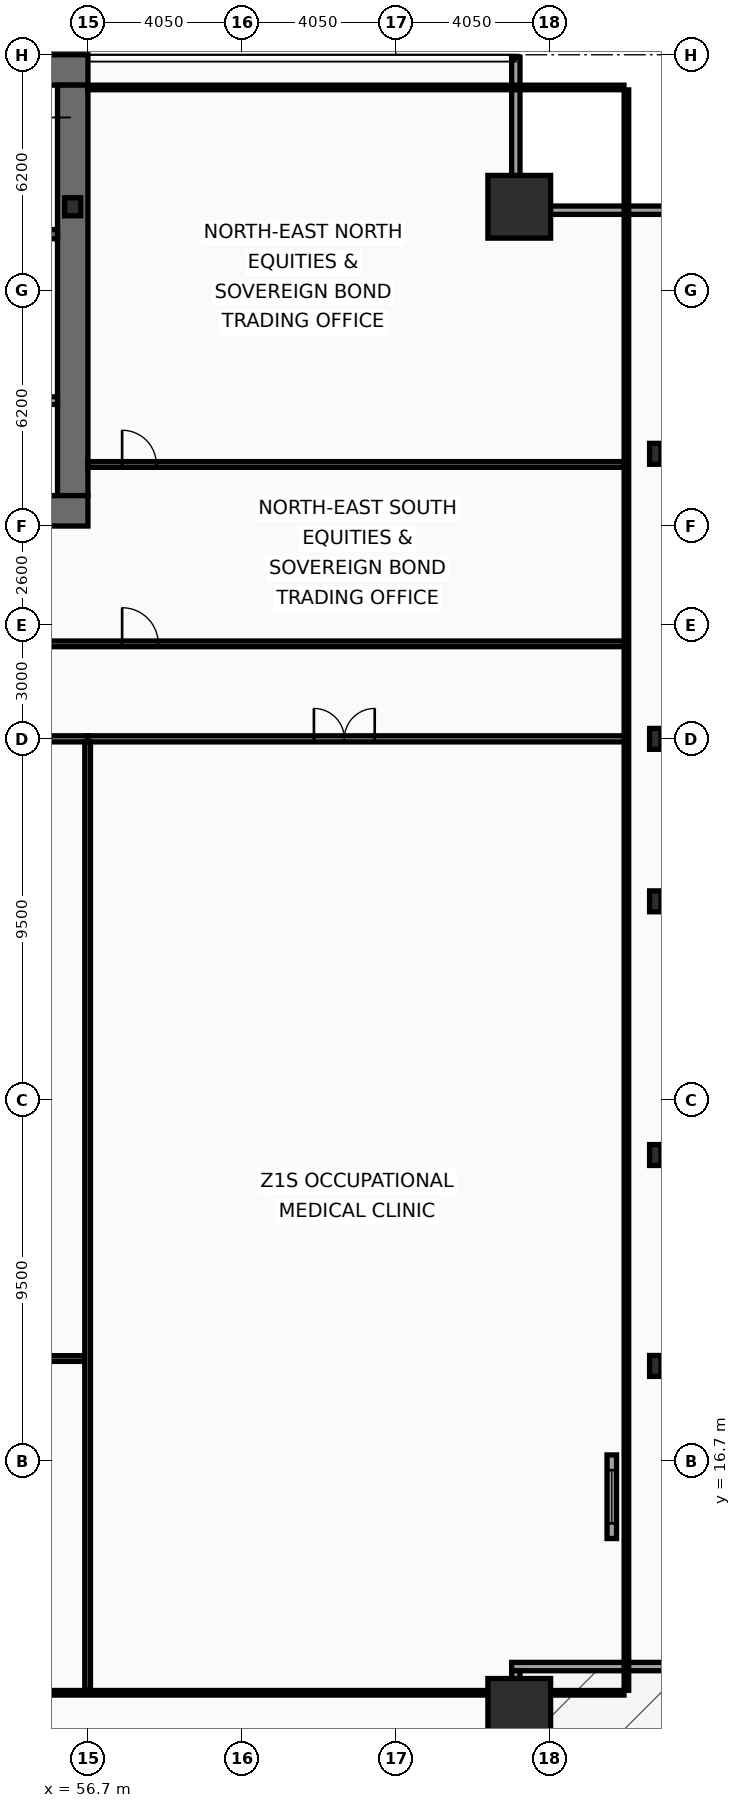
"""IFC4 building model, lengths in metres.
Left out: names, types, materials, properties, quantities, classifications, styles, units other than length and angle.
Written with IfcOpenShell. Run it as: python <this file> out.ifc"""

import sys

from ifc_helpers import new_model, si_unit, direction, frame, frame_2d, origin, origin_2d, place, context, subcontext, project, spatial, rectangle, hollow_rectangle, i_section, extrude, element, fill, save


model = new_model("IFC4")
c1 = context("Model", 3, precision=1e-05, world=origin(), true_north=direction((0.0, 1.0)))
c2 = subcontext(c1, "Body", "Model", "MODEL_VIEW")
j1 = project(units=[si_unit("LENGTHUNIT", "METRE"), si_unit("PLANEANGLEUNIT", "RADIAN")], contexts=[c1])
p1 = place(None, origin())
s1 = spatial("IfcSite", under=j1, at=p1, CompositionType="ELEMENT")
p2 = place(p1, origin())
s2 = spatial("IfcBuilding", under=s1, at=p2, CompositionType="ELEMENT")
p3 = place(p2, frame((0.0, 0.0, 25.8)))
s3 = spatial("IfcBuildingStorey", under=s2, at=p3, CompositionType="ELEMENT", Elevation=25.8)
p4 = place(p3, frame((16.2, 53.3, 0.0), z_axis=(0.0, 0.0, 1.0), x_axis=(1.0, 0.0, 0.0)))
e1 = element("IfcWall", 1, at=p4, inside=s3, PredefinedType="SHEAR", context=c2, shape_type="SweptSolid", body=[
    extrude(rectangle(XDim=40.5, YDim=0.8, at=frame_2d((20.25, 0.0))), origin(), (0.0, 0.0, 1.0), 3.82),
])
p5 = place(p3, frame((56.3, 52.9, 0.0), z_axis=(0.0, 0.0, 1.0), x_axis=(0.0, -1.0, 0.0)))
e2 = element("IfcWall", 2, at=p5, inside=s3, PredefinedType="SHEAR", context=c2, shape_type="SweptSolid", body=[
    extrude(rectangle(XDim=10.8, YDim=0.8, at=frame_2d((5.4, 0.0))), origin(), (0.0, 0.0, 1.0), 3.82),
])
p6 = place(p3, frame((56.7, 41.7, 0.0), z_axis=(0.0, 0.0, 1.0), x_axis=(-1.0, 0.0, 0.0)))
e3 = element("IfcWall", 3, at=p6, inside=s3, PredefinedType="SHEAR", context=c2, shape_type="SweptSolid", body=[
    extrude(rectangle(XDim=2.45, YDim=0.8, at=frame_2d((1.225, 0.0))), origin(), (0.0, 0.0, 1.0), 3.82),
])
p7 = place(p3, frame((48.63, 48.98, 0.0), z_axis=(0.0, 0.0, 1.0), x_axis=(1.0, 0.0, 0.0)))
e4 = element("IfcWall", 4, at=p7, inside=s3, PredefinedType="SHEAR", context=c2, shape_type="SweptSolid", body=[
    extrude(rectangle(XDim=7.27, YDim=0.24, at=frame_2d((3.635, 0.0))), origin(), (0.0, 0.0, 1.0), 3.82),
])
p8 = place(p7, frame((6.0, 0.0, 0.0)))
e5 = element("IfcOpeningElement", 5, at=p8, cuts=e4, PredefinedType="OPENING", context=c2, shape_type="SweptSolid", body=[
    extrude(rectangle(XDim=1.05, YDim=2.15, at=frame_2d((0.525, 1.075))), frame((0.0, 0.13, 0.0), z_axis=(0.0, -1.0, 0.0), x_axis=(1.0, 0.0, 0.0)), (0.0, 0.0, 1.0), 0.26),
])
for number, where, z_axis, x_axis in (
    (6, (68.05, 10.15, 0.0), (0.0, 0.0, 1.0), (1.0, 0.0, 0.0)),
    (7, (68.05, 49.7, 0.0), (0.0, 0.0, 1.0), (1.0, 0.0, 0.0)),
):
    element("IfcColumn", number, at=place(p3, frame(where, z_axis=z_axis, x_axis=x_axis)), inside=s3, PredefinedType="COLUMN", context=c2, shape_type="SweptSolid", body=[
        extrude(hollow_rectangle(XDim=1.65, YDim=1.65, WallThickness=0.075, at=origin_2d()), origin(), (0.0, 0.0, 1.0), 4.0),
    ])
for number, where, z_axis, x_axis in (
    (8, (71.63, 19.2, 0.0), (0.0, 0.0, 1.0), (1.0, 0.0, 0.0)),
    (9, (71.63, 24.75, 0.0), (0.0, 0.0, 1.0), (1.0, 0.0, 0.0)),
    (10, (71.63, 31.425, 0.0), (0.0, 0.0, 1.0), (1.0, 0.0, 0.0)),
    (11, (71.63, 35.7, 0.0), (0.0, 0.0, 1.0), (1.0, 0.0, 0.0)),
    (12, (71.63, 43.2, 0.0), (0.0, 0.0, 1.0), (1.0, 0.0, 0.0)),
):
    element("IfcColumn", number, at=place(p3, frame(where, z_axis=z_axis, x_axis=x_axis)), inside=s3, PredefinedType="COLUMN", context=c2, shape_type="SweptSolid", body=[
        extrude(i_section(OverallWidth=0.3, OverallDepth=0.55, WebThickness=0.015, FlangeThickness=0.029, at=origin_2d()), origin(), (0.0, 0.0, 1.0), 4.0),
    ])
p9 = place(p3, frame((56.3, 49.7, 0.0), z_axis=(0.0, 0.0, 1.0), x_axis=(1.0, 0.0, 0.0)))
e13 = element("IfcColumn", 13, at=p9, inside=s3, PredefinedType="COLUMN", context=c2, shape_type="SweptSolid", body=[
    extrude(i_section(OverallWidth=0.424, OverallDepth=0.474, WebThickness=0.048, FlangeThickness=0.077, at=origin_2d()), origin(), (0.0, 0.0, 1.0), 4.0),
])
p10 = place(p3, frame((67.96, 53.63, 0.0), z_axis=(0.0, 0.0, 1.0), x_axis=(0.0, -1.0, 0.0)))
e14 = element("IfcWall", 14, at=p10, inside=s3, PredefinedType="SOLIDWALL", context=c2, shape_type="SweptSolid", body=[
    extrude(rectangle(XDim=3.91, YDim=0.22, at=frame_2d((1.955, 0.0))), origin(), (0.0, 0.0, 1.0), 3.16),
])
for number, where, z_axis, x_axis in (
    (15, (67.85, 49.61, 0.0), (0.0, 0.0, 1.0), (1.0, 0.0, 0.0)),
    (16, (72.07, 11.29, 0.0), (0.0, 0.0, 1.0), (-1.0, 0.0, 0.0)),
):
    element("IfcWall", number, at=place(p3, frame(where, z_axis=z_axis, x_axis=x_axis)), inside=s3, PredefinedType="SOLIDWALL", context=c2, shape_type="SweptSolid", body=[
        extrude(rectangle(XDim=4.22, YDim=0.22, at=frame_2d((2.11, 0.0))), origin(), (0.0, 0.0, 1.0), 3.16),
    ])
p11 = place(p3, frame((67.96, 11.18, 0.0), z_axis=(0.0, 0.0, 1.0), x_axis=(0.0, -1.0, 0.0)))
e17 = element("IfcWall", 17, at=p11, inside=s3, PredefinedType="SOLIDWALL", context=c2, shape_type="SweptSolid", body=[
    extrude(rectangle(XDim=3.91, YDim=0.22, at=frame_2d((1.955, 0.0))), origin(), (0.0, 0.0, 1.0), 3.16),
])
p12 = place(p3, frame((70.485, 14.658, 0.0), z_axis=(0.0, 0.0, 1.0), x_axis=(0.0, 1.0, 0.0)))
e18 = element("IfcWall", 18, at=p12, inside=s3, PredefinedType="PARAPET", context=c2, shape_type="SweptSolid", body=[
    extrude(rectangle(XDim=2.2, YDim=0.25, at=frame_2d((1.1, 0.0))), origin(), (0.0, 0.0, 1.0), 0.88),
])
p13 = place(p12, frame((0.4, 0.0, 0.16)))
e19 = element("IfcOpeningElement", 19, at=p13, cuts=e18, PredefinedType="OPENING", context=c2, shape_type="SweptSolid", body=[
    extrude(rectangle(XDim=1.4, YDim=0.5, at=frame_2d((0.7, 0.25))), frame((0.0, 0.135, 0.0), z_axis=(0.0, -1.0, 0.0), x_axis=(1.0, 0.0, 0.0)), (0.0, 0.0, 1.0), 0.27),
])
p14 = place(p3, frame((51.9, 44.6, 0.0), z_axis=(0.0, 0.0, 1.0), x_axis=(1.0, 0.0, 0.0)))
e20 = element("IfcWall", 20, at=p14, inside=s3, PredefinedType="PARTITIONING", context=c2, shape_type="SweptSolid", body=[
    extrude(rectangle(XDim=4.0, YDim=0.2, at=frame_2d((2.0, 0.0))), origin(), (0.0, 0.0, 1.0), 3.82),
])
p15 = place(p14, frame((1.15, 0.0, 0.0)))
e21 = element("IfcOpeningElement", 21, at=p15, cuts=e20, PredefinedType="OPENING", context=c2, shape_type="SweptSolid", body=[
    extrude(rectangle(XDim=1.05, YDim=2.15, at=frame_2d((0.525, 1.075))), frame((0.0, 0.11, 0.0), z_axis=(0.0, -1.0, 0.0), x_axis=(1.0, 0.0, 0.0)), (0.0, 0.0, 1.0), 0.22),
])
p16 = place(p3, frame((54.35, 38.2, 0.0), z_axis=(0.0, 0.0, 1.0), x_axis=(1.0, 0.0, 0.0)))
e22 = element("IfcWall", 22, at=p16, inside=s3, PredefinedType="PARTITIONING", context=c2, shape_type="SweptSolid", body=[
    extrude(rectangle(XDim=16.52, YDim=0.15, at=frame_2d((8.26, 0.0))), origin(), (0.0, 0.0, 1.0), 3.01),
])
p17 = place(p16, frame((3.25, 0.0, 0.0)))
e23 = element("IfcOpeningElement", 23, at=p17, cuts=e22, PredefinedType="OPENING", context=c2, shape_type="SweptSolid", body=[
    extrude(rectangle(XDim=0.95, YDim=2.05, at=frame_2d((0.475, 1.025))), frame((0.0, 0.085, 0.0), z_axis=(0.0, -1.0, 0.0), x_axis=(1.0, 0.0, 0.0)), (0.0, 0.0, 1.0), 0.17),
])
p18 = place(p3, frame((56.7, 42.92, 0.0), z_axis=(0.0, 0.0, 1.0), x_axis=(1.0, 0.0, 0.0)))
e24 = element("IfcWall", 24, at=p18, inside=s3, PredefinedType="PARTITIONING", context=c2, shape_type="SweptSolid", body=[
    extrude(rectangle(XDim=14.105, YDim=0.15, at=frame_2d((7.052, 0.0))), origin(), (0.0, 0.0, 1.0), 3.01),
])
p19 = place(p18, frame((0.9, 0.0, 0.0)))
e25 = element("IfcOpeningElement", 25, at=p19, cuts=e24, PredefinedType="OPENING", context=c2, shape_type="SweptSolid", body=[
    extrude(rectangle(XDim=0.9, YDim=2.05, at=frame_2d((0.45, 1.025))), frame((0.0, 0.085, 0.0), z_axis=(0.0, -1.0, 0.0), x_axis=(1.0, 0.0, 0.0)), (0.0, 0.0, 1.0), 0.17),
])
p20 = place(p3, frame((42.487, 35.7, 0.0), z_axis=(0.0, 0.0, 1.0), x_axis=(1.0, 0.0, 0.0)))
e26 = element("IfcWall", 26, at=p20, inside=s3, PredefinedType="PARTITIONING", context=c2, shape_type="SweptSolid", body=[
    extrude(rectangle(XDim=14.205, YDim=0.16, at=frame_2d((7.103, 0.0))), origin(), (0.0, 0.0, 1.0), 3.01),
])
p21 = place(p20, frame((6.216, 0.0, 0.0)))
e27 = element("IfcOpeningElement", 27, at=p21, cuts=e26, PredefinedType="OPENING", context=c2, shape_type="SweptSolid", body=[
    extrude(rectangle(XDim=1.6, YDim=2.15, at=frame_2d((0.8, 1.075))), frame((0.0, 0.09, 0.0), z_axis=(0.0, -1.0, 0.0), x_axis=(1.0, 0.0, 0.0)), (0.0, 0.0, 1.0), 0.18),
])
p22 = place(p3, frame((42.567, 19.395, 0.0), z_axis=(0.0, 0.0, 1.0), x_axis=(1.0, 0.0, 0.0)))
e28 = element("IfcWall", 28, at=p22, inside=s3, PredefinedType="PARTITIONING", context=c2, shape_type="SweptSolid", body=[
    extrude(rectangle(XDim=14.046, YDim=0.15, at=frame_2d((7.023, 0.0))), origin(), (0.0, 0.0, 1.0), 3.01),
])
p23 = place(p22, frame((6.393, 0.0, 0.0)))
e29 = element("IfcOpeningElement", 29, at=p23, cuts=e28, PredefinedType="OPENING", context=c2, shape_type="SweptSolid", body=[
    extrude(rectangle(XDim=0.9, YDim=2.05, at=frame_2d((0.45, 1.025))), frame((0.0, 0.085, 0.0), z_axis=(0.0, -1.0, 0.0), x_axis=(1.0, 0.0, 0.0)), (0.0, 0.0, 1.0), 0.17),
])
p24 = place(p3, frame((56.692, 35.7, 0.0), z_axis=(0.0, 0.0, 1.0), x_axis=(1.0, 0.0, 0.0)))
e30 = element("IfcWall", 30, at=p24, inside=s3, PredefinedType="PARTITIONING", context=c2, shape_type="SweptSolid", body=[
    extrude(rectangle(XDim=14.178, YDim=0.16, at=frame_2d((7.089, 0.0))), origin(), (0.0, 0.0, 1.0), 3.01),
])
p25 = place(p24, frame((5.955, 0.0, 0.0)))
e31 = element("IfcOpeningElement", 31, at=p25, cuts=e30, PredefinedType="OPENING", context=c2, shape_type="SweptSolid", body=[
    extrude(rectangle(XDim=1.6, YDim=2.15, at=frame_2d((0.8, 1.075))), frame((0.0, 0.09, 0.0), z_axis=(0.0, -1.0, 0.0), x_axis=(1.0, 0.0, 0.0)), (0.0, 0.0, 1.0), 0.18),
])
p26 = place(p3, frame((56.692, 10.665, 0.0), z_axis=(0.0, 0.0, 1.0), x_axis=(0.0, 1.0, 0.0)))
e32 = element("IfcWall", 32, at=p26, inside=s3, PredefinedType="PARTITIONING", context=c2, shape_type="SweptSolid", body=[
    extrude(rectangle(XDim=24.95, YDim=0.15, at=frame_2d((12.475, 0.0))), origin(), (0.0, 0.0, 1.0), 3.01),
])
p27 = place(p3, frame((70.87, 10.665, 0.0), z_axis=(0.0, 0.0, 1.0), x_axis=(0.0, 1.0, 0.0)))
e33 = element("IfcWall", 33, at=p27, inside=s3, PredefinedType="PARTITIONING", context=c2, shape_type="SweptSolid", body=[
    extrude(rectangle(XDim=42.11, YDim=0.12, at=frame_2d((21.055, 0.0))), origin(), (0.0, 0.0, 1.0), 3.01),
])
p28 = place(p3, frame((56.7, 52.84, 0.0), z_axis=(0.0, 0.0, 1.0), x_axis=(1.0, 0.0, 0.0)))
e34 = element("IfcWall", 34, at=p28, inside=s3, PredefinedType="PARTITIONING", context=c2, shape_type="SweptSolid", body=[
    extrude(rectangle(XDim=14.105, YDim=0.12, at=frame_2d((7.052, 0.0))), origin(), (0.0, 0.0, 1.0), 3.82),
])
p29 = place(p3, frame((2.095, 10.6, 0.0), z_axis=(0.0, 0.0, 1.0), x_axis=(1.0, 0.0, 0.0)))
e35 = element("IfcWall", 35, at=p29, inside=s3, PredefinedType="PARTITIONING", context=c2, shape_type="SweptSolid", body=[
    extrude(rectangle(XDim=68.71, YDim=0.12, at=frame_2d((34.355, 0.0))), origin(), (0.0, 0.0, 1.0), 3.01),
])
p30 = place(p13, origin())
e36 = element("IfcWindow", 36, at=p30, inside=s3, PartitioningType="SINGLE_PANEL", PredefinedType="SKYLIGHT", context=c2, shape_type="SweptSolid", body=[
    extrude(rectangle(XDim=1.4, YDim=0.5, at=frame_2d((0.7, 0.25))), frame((0.0, 0.03, 0.0), z_axis=(0.0, -1.0, 0.0), x_axis=(1.0, 0.0, 0.0)), (0.0, 0.0, 1.0), 0.06),
])
fill(e19, e36)
p31 = place(p17, origin())
e37 = element("IfcDoor", 37, at=p31, inside=s3, OperationType="SINGLE_SWING_LEFT", PredefinedType="DOOR", context=c2, shape_type="SweptSolid", body=[
    extrude(rectangle(XDim=0.95, YDim=2.05, at=frame_2d((0.475, 1.025))), frame((0.0, 0.025, 0.0), z_axis=(0.0, -1.0, 0.0), x_axis=(1.0, 0.0, 0.0)), (0.0, 0.0, 1.0), 0.05),
])
fill(e23, e37)
p32 = place(p19, origin())
e38 = element("IfcDoor", 38, at=p32, inside=s3, OperationType="SINGLE_SWING_LEFT", PredefinedType="DOOR", context=c2, shape_type="SweptSolid", body=[
    extrude(rectangle(XDim=0.9, YDim=2.05, at=frame_2d((0.45, 1.025))), frame((0.0, 0.025, 0.0), z_axis=(0.0, -1.0, 0.0), x_axis=(1.0, 0.0, 0.0)), (0.0, 0.0, 1.0), 0.05),
])
fill(e25, e38)
p33 = place(p25, origin())
e39 = element("IfcDoor", 39, at=p33, inside=s3, OperationType="DOUBLE_DOOR_SINGLE_SWING", PredefinedType="DOOR", context=c2, shape_type="SweptSolid", body=[
    extrude(rectangle(XDim=1.6, YDim=2.15, at=frame_2d((0.8, 1.075))), frame((0.0, 0.025, 0.0), z_axis=(0.0, -1.0, 0.0), x_axis=(1.0, 0.0, 0.0)), (0.0, 0.0, 1.0), 0.05),
])
fill(e31, e39)
save(model, sys.argv[1])
